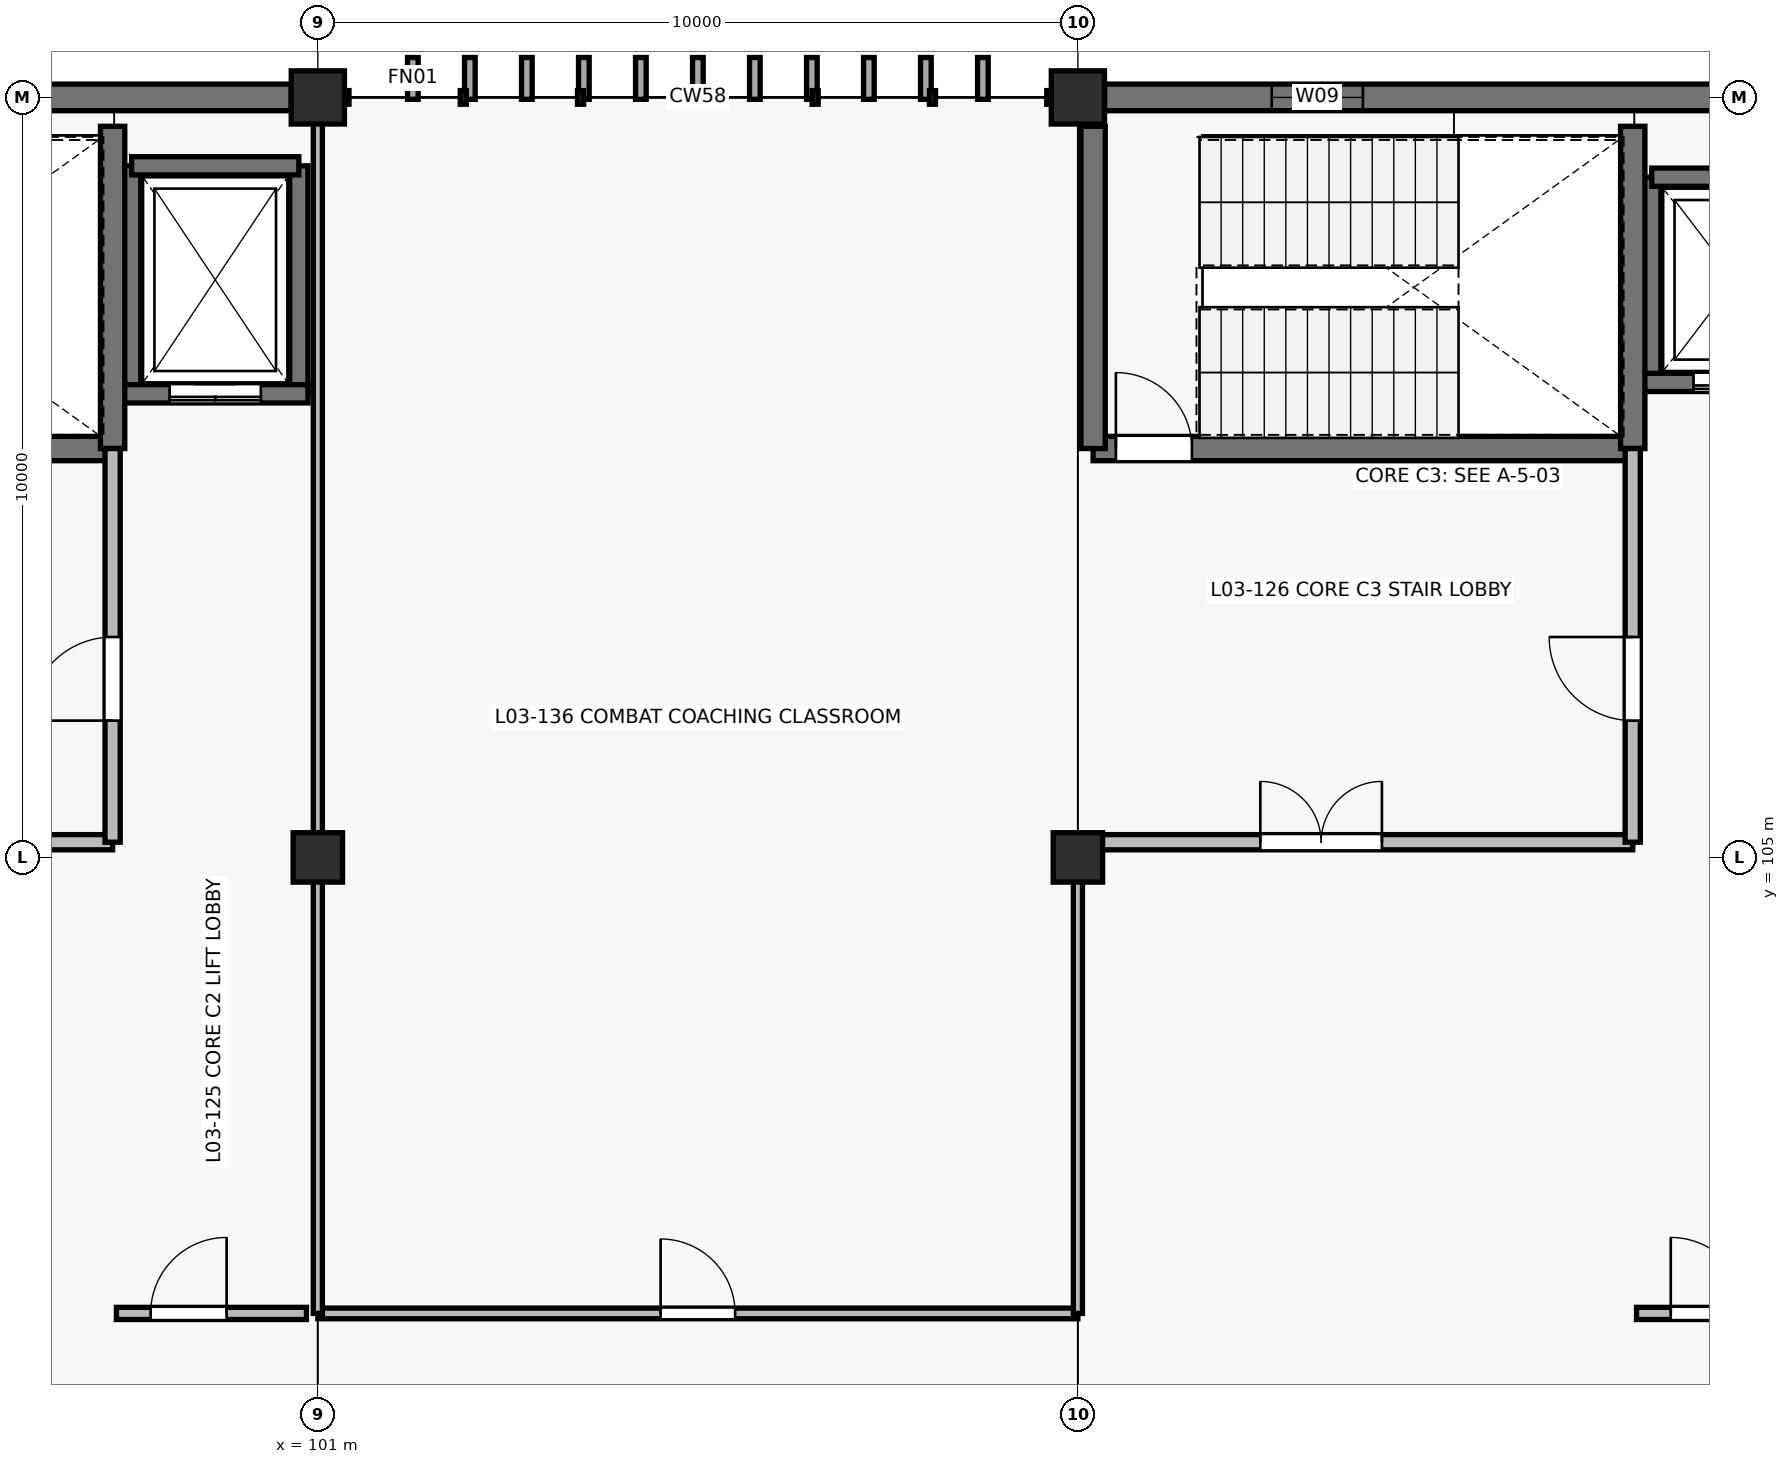
"""IFC4 building model, lengths in metres.
Left out: names, types, materials, properties, quantities, classifications, styles, units other than length and angle.
Written with IfcOpenShell. Run it as: python <this file> out.ifc"""

import sys

from ifc_helpers import new_model, si_unit, direction, frame, frame_2d, origin, origin_2d, place, context, subcontext, project, spatial, rectangle, circle, extrude, element, fill, save


model = new_model("IFC4")
c1 = context("Model", 3, precision=1e-05, world=origin(), true_north=direction((0.0, 1.0)))
c2 = subcontext(c1, "Body", "Model", "MODEL_VIEW")
j1 = project(units=[si_unit("LENGTHUNIT", "METRE"), si_unit("PLANEANGLEUNIT", "RADIAN")], contexts=[c1])
p1 = place(None, origin())
s1 = spatial("IfcSite", under=j1, at=p1, CompositionType="ELEMENT")
p2 = place(p1, origin())
s2 = spatial("IfcBuilding", under=s1, at=p2, CompositionType="ELEMENT")
p3 = place(p2, frame((0.0, 0.0, 13.2)))
s3 = spatial("IfcBuildingStorey", under=s2, at=p3, CompositionType="ELEMENT", Elevation=13.2)
p4 = place(p3, frame((101.0, 105.0, 0.0), z_axis=(0.0, 0.0, 1.0), x_axis=(1.0, 0.0, 0.0)))
e1 = element("IfcColumn", 1, at=p4, inside=s3, PredefinedType="COLUMN", context=c2, shape_type="SweptSolid", body=[
    extrude(rectangle(XDim=0.65, YDim=0.65, at=origin_2d()), origin(), (0.0, 0.0, 1.0), 4.2),
])
p5 = place(p3, frame((101.0, 115.0, 0.0), z_axis=(0.0, 0.0, 1.0), x_axis=(1.0, 0.0, 0.0)))
e2 = element("IfcColumn", 2, at=p5, inside=s3, PredefinedType="COLUMN", context=c2, shape_type="SweptSolid", body=[
    extrude(circle(Radius=0.35, at=origin_2d()), origin(), (0.0, 0.0, 1.0), 4.2),
])
p6 = place(p3, frame((111.0, 105.0, 0.0), z_axis=(0.0, 0.0, 1.0), x_axis=(1.0, 0.0, 0.0)))
e3 = element("IfcColumn", 3, at=p6, inside=s3, PredefinedType="COLUMN", context=c2, shape_type="SweptSolid", body=[
    extrude(rectangle(XDim=0.65, YDim=0.65, at=origin_2d()), origin(), (0.0, 0.0, 1.0), 4.2),
])
p7 = place(p3, frame((111.0, 115.0, 0.0), z_axis=(0.0, 0.0, 1.0), x_axis=(1.0, 0.0, 0.0)))
e4 = element("IfcColumn", 4, at=p7, inside=s3, PredefinedType="COLUMN", context=c2, shape_type="SweptSolid", body=[
    extrude(circle(Radius=0.35, at=origin_2d()), origin(), (0.0, 0.0, 1.0), 4.2),
])
p8 = place(p3, frame((91.35, 115.0, 0.0), z_axis=(0.0, 0.0, 1.0), x_axis=(1.0, 0.0, 0.0)))
e5 = element("IfcWall", 5, at=p8, inside=s3, PredefinedType="SOLIDWALL", context=c2, shape_type="SweptSolid", body=[
    extrude(rectangle(XDim=9.3, YDim=0.35, at=frame_2d((4.65, 0.0))), origin(), (0.0, 0.0, 1.0), 4.2),
])
p9 = place(p8, frame((2.2, 0.0, 1.0)))
e6 = element("IfcOpeningElement", 6, at=p9, cuts=e5, PredefinedType="OPENING", context=c2, shape_type="SweptSolid", body=[
    extrude(rectangle(XDim=2.4, YDim=1.5, at=frame_2d((1.2, 0.75))), frame((0.0, 0.185, 0.0), z_axis=(0.0, -1.0, 0.0), x_axis=(1.0, 0.0, 0.0)), (0.0, 0.0, 1.0), 0.37),
])
p10 = place(p3, frame((111.35, 115.0, 0.0), z_axis=(0.0, 0.0, 1.0), x_axis=(1.0, 0.0, 0.0)))
e7 = element("IfcWall", 7, at=p10, inside=s3, PredefinedType="SOLIDWALL", context=c2, shape_type="SweptSolid", body=[
    extrude(rectangle(XDim=9.3, YDim=0.35, at=frame_2d((4.65, 0.0))), origin(), (0.0, 0.0, 1.0), 4.2),
])
p11 = place(p10, frame((2.2, 0.0, 1.0)))
e8 = element("IfcOpeningElement", 8, at=p11, cuts=e7, PredefinedType="OPENING", context=c2, shape_type="SweptSolid", body=[
    extrude(rectangle(XDim=1.2, YDim=1.8, at=frame_2d((0.6, 0.9))), frame((0.0, 0.185, 0.0), z_axis=(0.0, -1.0, 0.0), x_axis=(1.0, 0.0, 0.0)), (0.0, 0.0, 1.0), 0.37),
])
for number, where, z_axis, x_axis in (
    (9, (98.55, 111.1, 0.0), (0.0, 0.0, 1.0), (0.0, 1.0, 0.0)),
    (10, (100.75, 114.1, 0.0), (0.0, 0.0, 1.0), (0.0, -1.0, 0.0)),
):
    element("IfcWall", number, at=place(p3, frame(where, z_axis=z_axis, x_axis=x_axis)), inside=s3, PredefinedType="SHEAR", context=c2, shape_type="SweptSolid", body=[
        extrude(rectangle(XDim=3.0, YDim=0.24, at=frame_2d((1.5, 0.0))), origin(), (0.0, 0.0, 1.0), 4.2),
    ])
p12 = place(p3, frame((98.55, 114.1, 0.0), z_axis=(0.0, 0.0, 1.0), x_axis=(1.0, 0.0, 0.0)))
e11 = element("IfcWall", 11, at=p12, inside=s3, PredefinedType="SHEAR", context=c2, shape_type="SweptSolid", body=[
    extrude(rectangle(XDim=2.2, YDim=0.24, at=frame_2d((1.1, 0.0))), origin(), (0.0, 0.0, 1.0), 4.2),
])
p13 = place(p3, frame((100.87, 111.1, 0.0), z_axis=(0.0, 0.0, 1.0), x_axis=(-1.0, 0.0, 0.0)))
e12 = element("IfcWall", 12, at=p13, inside=s3, PredefinedType="SHEAR", context=c2, shape_type="SweptSolid", body=[
    extrude(rectangle(XDim=2.44, YDim=0.24, at=frame_2d((1.22, 0.0))), origin(), (0.0, 0.0, 1.0), 4.2),
])
p14 = place(p13, frame((0.62, 0.0, 0.0)))
e13 = element("IfcOpeningElement", 13, at=p14, cuts=e12, PredefinedType="OPENING", context=c2, shape_type="SweptSolid", body=[
    extrude(rectangle(XDim=1.2, YDim=2.15, at=frame_2d((0.6, 1.075))), frame((0.0, 0.13, 0.0), z_axis=(0.0, -1.0, 0.0), x_axis=(1.0, 0.0, 0.0)), (0.0, 0.0, 1.0), 0.26),
])
p15 = place(p3, frame((118.55, 111.25, 0.0), z_axis=(0.0, 0.0, 1.0), x_axis=(0.0, 1.0, 0.0)))
e14 = element("IfcWall", 14, at=p15, inside=s3, PredefinedType="SHEAR", context=c2, shape_type="SweptSolid", body=[
    extrude(rectangle(XDim=2.7, YDim=0.24, at=frame_2d((1.35, 0.0))), origin(), (0.0, 0.0, 1.0), 4.2),
])
p16 = place(p3, frame((118.55, 113.95, 0.0), z_axis=(0.0, 0.0, 1.0), x_axis=(1.0, 0.0, 0.0)))
e15 = element("IfcWall", 15, at=p16, inside=s3, PredefinedType="SHEAR", context=c2, shape_type="SweptSolid", body=[
    extrude(rectangle(XDim=2.2, YDim=0.24, at=frame_2d((1.1, 0.0))), origin(), (0.0, 0.0, 1.0), 4.2),
])
p17 = place(p3, frame((120.87, 111.25, 0.0), z_axis=(0.0, 0.0, 1.0), x_axis=(-1.0, 0.0, 0.0)))
e16 = element("IfcWall", 16, at=p17, inside=s3, PredefinedType="SHEAR", context=c2, shape_type="SweptSolid", body=[
    extrude(rectangle(XDim=2.44, YDim=0.24, at=frame_2d((1.22, 0.0))), origin(), (0.0, 0.0, 1.0), 4.2),
])
p18 = place(p17, frame((0.67, 0.0, 0.0)))
e17 = element("IfcOpeningElement", 17, at=p18, cuts=e16, PredefinedType="OPENING", context=c2, shape_type="SweptSolid", body=[
    extrude(rectangle(XDim=1.1, YDim=2.15, at=frame_2d((0.55, 1.075))), frame((0.0, 0.13, 0.0), z_axis=(0.0, -1.0, 0.0), x_axis=(1.0, 0.0, 0.0)), (0.0, 0.0, 1.0), 0.26),
])
p19 = place(p3, frame((91.2, 110.38, 0.0), z_axis=(0.0, 0.0, 1.0), x_axis=(1.0, 0.0, 0.0)))
e18 = element("IfcWall", 18, at=p19, inside=s3, PredefinedType="SHEAR", context=c2, shape_type="SweptSolid", body=[
    extrude(rectangle(XDim=7.1, YDim=0.32, at=frame_2d((3.55, 0.0))), origin(), (0.0, 0.0, 1.0), 4.2),
])
p20 = place(p19, frame((0.3, 0.0, 0.0)))
e19 = element("IfcOpeningElement", 19, at=p20, cuts=e18, PredefinedType="OPENING", context=c2, shape_type="SweptSolid", body=[
    extrude(rectangle(XDim=1.0, YDim=2.15, at=frame_2d((0.5, 1.075))), frame((0.0, 0.17, 0.0), z_axis=(0.0, -1.0, 0.0), x_axis=(1.0, 0.0, 0.0)), (0.0, 0.0, 1.0), 0.34),
])
p21 = place(p3, frame((98.3, 110.38, 0.0), z_axis=(0.0, 0.0, 1.0), x_axis=(0.0, 1.0, 0.0)))
e20 = element("IfcWall", 20, at=p21, inside=s3, PredefinedType="SHEAR", context=c2, shape_type="SweptSolid", body=[
    extrude(rectangle(XDim=4.24, YDim=0.32, at=frame_2d((2.12, 0.0))), origin(), (0.0, 0.0, 1.0), 4.2),
])
p22 = place(p3, frame((91.2, 105.2, 0.0), z_axis=(0.0, 0.0, 1.0), x_axis=(1.0, 0.0, 0.0)))
e21 = element("IfcWall", 21, at=p22, inside=s3, PredefinedType="PARTITIONING", context=c2, shape_type="SweptSolid", body=[
    extrude(rectangle(XDim=7.1, YDim=0.2, at=frame_2d((3.55, 0.0))), origin(), (0.0, 0.0, 1.0), 3.005),
])
p23 = place(p22, frame((2.2, 0.0, 0.0)))
e22 = element("IfcOpeningElement", 22, at=p23, cuts=e21, PredefinedType="OPENING", context=c2, shape_type="SweptSolid", body=[
    extrude(rectangle(XDim=1.6, YDim=2.2, at=frame_2d((0.8, 1.1))), frame((0.0, 0.11, 0.0), z_axis=(0.0, -1.0, 0.0), x_axis=(1.0, 0.0, 0.0)), (0.0, 0.0, 1.0), 0.22),
])
p24 = place(p3, frame((98.3, 105.2, 0.0), z_axis=(0.0, 0.0, 1.0), x_axis=(0.0, 1.0, 0.0)))
e23 = element("IfcWall", 23, at=p24, inside=s3, PredefinedType="PARTITIONING", context=c2, shape_type="SweptSolid", body=[
    extrude(rectangle(XDim=5.18, YDim=0.2, at=frame_2d((2.59, 0.0))), origin(), (0.0, 0.0, 1.0), 3.005),
])
p25 = place(p24, frame((1.6, 0.0, 0.0)))
e24 = element("IfcOpeningElement", 24, at=p25, cuts=e23, PredefinedType="OPENING", context=c2, shape_type="SweptSolid", body=[
    extrude(rectangle(XDim=1.1, YDim=2.15, at=frame_2d((0.55, 1.075))), frame((0.0, 0.11, 0.0), z_axis=(0.0, -1.0, 0.0), x_axis=(1.0, 0.0, 0.0)), (0.0, 0.0, 1.0), 0.22),
])
p26 = place(p3, frame((98.35, 99.0, 0.0), z_axis=(0.0, 0.0, 1.0), x_axis=(1.0, 0.0, 0.0)))
e25 = element("IfcWall", 25, at=p26, inside=s3, PredefinedType="PARTITIONING", context=c2, shape_type="SweptSolid", body=[
    extrude(rectangle(XDim=2.5, YDim=0.16, at=frame_2d((1.25, 0.0))), origin(), (0.0, 0.0, 1.0), 3.005),
])
p27 = place(p26, frame((0.45, 0.0, 0.0)))
e26 = element("IfcOpeningElement", 26, at=p27, cuts=e25, PredefinedType="OPENING", context=c2, shape_type="SweptSolid", body=[
    extrude(rectangle(XDim=1.0, YDim=2.15, at=frame_2d((0.5, 1.075))), frame((0.0, 0.09, 0.0), z_axis=(0.0, -1.0, 0.0), x_axis=(1.0, 0.0, 0.0)), (0.0, 0.0, 1.0), 0.18),
])
p28 = place(p3, frame((111.2, 110.38, 0.0), z_axis=(0.0, 0.0, 1.0), x_axis=(1.0, 0.0, 0.0)))
e27 = element("IfcWall", 27, at=p28, inside=s3, PredefinedType="SHEAR", context=c2, shape_type="SweptSolid", body=[
    extrude(rectangle(XDim=7.1, YDim=0.32, at=frame_2d((3.55, 0.0))), origin(), (0.0, 0.0, 1.0), 4.2),
])
p29 = place(p28, frame((0.3, 0.0, 0.0)))
e28 = element("IfcOpeningElement", 28, at=p29, cuts=e27, PredefinedType="OPENING", context=c2, shape_type="SweptSolid", body=[
    extrude(rectangle(XDim=1.0, YDim=2.15, at=frame_2d((0.5, 1.075))), frame((0.0, 0.17, 0.0), z_axis=(0.0, -1.0, 0.0), x_axis=(1.0, 0.0, 0.0)), (0.0, 0.0, 1.0), 0.34),
])
for number, where, z_axis, x_axis in (
    (29, (118.3, 110.38, 0.0), (0.0, 0.0, 1.0), (0.0, 1.0, 0.0)),
    (30, (111.2, 114.62, 0.0), (0.0, 0.0, 1.0), (0.0, -1.0, 0.0)),
):
    element("IfcWall", number, at=place(p3, frame(where, z_axis=z_axis, x_axis=x_axis)), inside=s3, PredefinedType="SHEAR", context=c2, shape_type="SweptSolid", body=[
        extrude(rectangle(XDim=4.24, YDim=0.32, at=frame_2d((2.12, 0.0))), origin(), (0.0, 0.0, 1.0), 4.2),
    ])
p30 = place(p3, frame((111.2, 105.2, 0.0), z_axis=(0.0, 0.0, 1.0), x_axis=(1.0, 0.0, 0.0)))
e31 = element("IfcWall", 31, at=p30, inside=s3, PredefinedType="PARTITIONING", context=c2, shape_type="SweptSolid", body=[
    extrude(rectangle(XDim=7.1, YDim=0.2, at=frame_2d((3.55, 0.0))), origin(), (0.0, 0.0, 1.0), 3.005),
])
p31 = place(p30, frame((2.2, 0.0, 0.0)))
e32 = element("IfcOpeningElement", 32, at=p31, cuts=e31, PredefinedType="OPENING", context=c2, shape_type="SweptSolid", body=[
    extrude(rectangle(XDim=1.6, YDim=2.2, at=frame_2d((0.8, 1.1))), frame((0.0, 0.11, 0.0), z_axis=(0.0, -1.0, 0.0), x_axis=(1.0, 0.0, 0.0)), (0.0, 0.0, 1.0), 0.22),
])
p32 = place(p3, frame((118.3, 105.2, 0.0), z_axis=(0.0, 0.0, 1.0), x_axis=(0.0, 1.0, 0.0)))
e33 = element("IfcWall", 33, at=p32, inside=s3, PredefinedType="PARTITIONING", context=c2, shape_type="SweptSolid", body=[
    extrude(rectangle(XDim=5.18, YDim=0.2, at=frame_2d((2.59, 0.0))), origin(), (0.0, 0.0, 1.0), 3.005),
])
p33 = place(p32, frame((1.6, 0.0, 0.0)))
e34 = element("IfcOpeningElement", 34, at=p33, cuts=e33, PredefinedType="OPENING", context=c2, shape_type="SweptSolid", body=[
    extrude(rectangle(XDim=1.1, YDim=2.15, at=frame_2d((0.55, 1.075))), frame((0.0, 0.11, 0.0), z_axis=(0.0, -1.0, 0.0), x_axis=(1.0, 0.0, 0.0)), (0.0, 0.0, 1.0), 0.22),
])
p34 = place(p3, frame((118.35, 99.0, 0.0), z_axis=(0.0, 0.0, 1.0), x_axis=(1.0, 0.0, 0.0)))
e35 = element("IfcWall", 35, at=p34, inside=s3, PredefinedType="PARTITIONING", context=c2, shape_type="SweptSolid", body=[
    extrude(rectangle(XDim=2.5, YDim=0.16, at=frame_2d((1.25, 0.0))), origin(), (0.0, 0.0, 1.0), 3.005),
])
p35 = place(p34, frame((0.45, 0.0, 0.0)))
e36 = element("IfcOpeningElement", 36, at=p35, cuts=e35, PredefinedType="OPENING", context=c2, shape_type="SweptSolid", body=[
    extrude(rectangle(XDim=1.0, YDim=2.15, at=frame_2d((0.5, 1.075))), frame((0.0, 0.09, 0.0), z_axis=(0.0, -1.0, 0.0), x_axis=(1.0, 0.0, 0.0)), (0.0, 0.0, 1.0), 0.18),
])
p36 = place(p3, frame((101.0, 99.0, 0.0), z_axis=(0.0, 0.0, 1.0), x_axis=(1.0, 0.0, 0.0)))
e37 = element("IfcWall", 37, at=p36, inside=s3, PredefinedType="PARTITIONING", context=c2, shape_type="SweptSolid", body=[
    extrude(rectangle(XDim=10.0, YDim=0.14, at=frame_2d((5.0, 0.0))), origin(), (0.0, 0.0, 1.0), 3.005),
])
p37 = place(p36, frame((4.51, 0.0, 0.0)))
e38 = element("IfcOpeningElement", 38, at=p37, cuts=e37, PredefinedType="OPENING", context=c2, shape_type="SweptSolid", body=[
    extrude(rectangle(XDim=0.98, YDim=2.1, at=frame_2d((0.49, 1.05))), frame((0.0, 0.08, 0.0), z_axis=(0.0, -1.0, 0.0), x_axis=(1.0, 0.0, 0.0)), (0.0, 0.0, 1.0), 0.16),
])
p38 = place(p3, frame((101.0, 99.0, 0.0), z_axis=(0.0, 0.0, 1.0), x_axis=(0.0, 1.0, 0.0)))
e39 = element("IfcWall", 39, at=p38, inside=s3, PredefinedType="PARTITIONING", context=c2, shape_type="SweptSolid", body=[
    extrude(rectangle(XDim=15.75, YDim=0.12, at=frame_2d((7.875, 0.0))), origin(), (0.0, 0.0, 1.0), 3.005),
])
p39 = place(p3, frame((111.0, 99.0, 0.0), z_axis=(0.0, 0.0, 1.0), x_axis=(0.0, 1.0, 0.0)))
e40 = element("IfcWall", 40, at=p39, inside=s3, PredefinedType="PARTITIONING", context=c2, shape_type="SweptSolid", body=[
    extrude(rectangle(XDim=6.2, YDim=0.12, at=frame_2d((3.1, 0.0))), origin(), (0.0, 0.0, 1.0), 3.005),
])
p40 = place(p11, origin())
e41 = element("IfcWindow", 41, at=p40, inside=s3, PartitioningType="SINGLE_PANEL", PredefinedType="WINDOW", context=c2, shape_type="SweptSolid", body=[
    extrude(rectangle(XDim=1.2, YDim=1.8, at=frame_2d((0.6, 0.9))), frame((0.0, 0.03, 0.0), z_axis=(0.0, -1.0, 0.0), x_axis=(1.0, 0.0, 0.0)), (0.0, 0.0, 1.0), 0.06),
])
fill(e8, e41)
p41 = place(p14, origin())
e42 = element("IfcDoor", 42, at=p41, inside=s3, OperationType="DOUBLE_DOOR_SLIDING", PredefinedType="USERDEFINED", context=c2, shape_type="SweptSolid", body=[
    extrude(rectangle(XDim=1.2, YDim=2.15, at=frame_2d((0.6, 1.075))), frame((0.0, 0.025, 0.0), z_axis=(0.0, -1.0, 0.0), x_axis=(1.0, 0.0, 0.0)), (0.0, 0.0, 1.0), 0.05),
])
fill(e13, e42)
p42 = place(p18, origin())
e43 = element("IfcDoor", 43, at=p42, inside=s3, OperationType="DOUBLE_DOOR_SLIDING", PredefinedType="USERDEFINED", context=c2, shape_type="SweptSolid", body=[
    extrude(rectangle(XDim=1.1, YDim=2.15, at=frame_2d((0.55, 1.075))), frame((0.0, 0.025, 0.0), z_axis=(0.0, -1.0, 0.0), x_axis=(1.0, 0.0, 0.0)), (0.0, 0.0, 1.0), 0.05),
])
fill(e17, e43)
p43 = place(p25, origin())
e44 = element("IfcDoor", 44, at=p43, inside=s3, OperationType="SINGLE_SWING_LEFT", PredefinedType="DOOR", context=c2, shape_type="SweptSolid", body=[
    extrude(rectangle(XDim=1.1, YDim=2.15, at=frame_2d((0.55, 1.075))), frame((0.0, 0.025, 0.0), z_axis=(0.0, -1.0, 0.0), x_axis=(1.0, 0.0, 0.0)), (0.0, 0.0, 1.0), 0.05),
])
fill(e24, e44)
p44 = place(p27, origin())
e45 = element("IfcDoor", 45, at=p44, inside=s3, OperationType="SINGLE_SWING_RIGHT", PredefinedType="DOOR", context=c2, shape_type="SweptSolid", body=[
    extrude(rectangle(XDim=1.0, YDim=2.15, at=frame_2d((0.5, 1.075))), frame((0.0, 0.025, 0.0), z_axis=(0.0, -1.0, 0.0), x_axis=(1.0, 0.0, 0.0)), (0.0, 0.0, 1.0), 0.05),
])
fill(e26, e45)
p45 = place(p29, origin())
e46 = element("IfcDoor", 46, at=p45, inside=s3, OperationType="SINGLE_SWING_LEFT", PredefinedType="DOOR", context=c2, shape_type="SweptSolid", body=[
    extrude(rectangle(XDim=1.0, YDim=2.15, at=frame_2d((0.5, 1.075))), frame((0.0, 0.025, 0.0), z_axis=(0.0, -1.0, 0.0), x_axis=(1.0, 0.0, 0.0)), (0.0, 0.0, 1.0), 0.05),
])
fill(e28, e46)
p46 = place(p31, origin())
e47 = element("IfcDoor", 47, at=p46, inside=s3, OperationType="DOUBLE_DOOR_SINGLE_SWING", PredefinedType="DOOR", context=c2, shape_type="SweptSolid", body=[
    extrude(rectangle(XDim=1.6, YDim=2.2, at=frame_2d((0.8, 1.1))), frame((0.0, 0.025, 0.0), z_axis=(0.0, -1.0, 0.0), x_axis=(1.0, 0.0, 0.0)), (0.0, 0.0, 1.0), 0.05),
])
fill(e32, e47)
p47 = place(p33, origin())
e48 = element("IfcDoor", 48, at=p47, inside=s3, OperationType="SINGLE_SWING_RIGHT", PredefinedType="DOOR", context=c2, shape_type="SweptSolid", body=[
    extrude(rectangle(XDim=1.1, YDim=2.15, at=frame_2d((0.55, 1.075))), frame((0.0, 0.025, 0.0), z_axis=(0.0, -1.0, 0.0), x_axis=(1.0, 0.0, 0.0)), (0.0, 0.0, 1.0), 0.05),
])
fill(e34, e48)
p48 = place(p35, origin())
e49 = element("IfcDoor", 49, at=p48, inside=s3, OperationType="SINGLE_SWING_LEFT", PredefinedType="DOOR", context=c2, shape_type="SweptSolid", body=[
    extrude(rectangle(XDim=1.0, YDim=2.15, at=frame_2d((0.5, 1.075))), frame((0.0, 0.025, 0.0), z_axis=(0.0, -1.0, 0.0), x_axis=(1.0, 0.0, 0.0)), (0.0, 0.0, 1.0), 0.05),
])
fill(e36, e49)
p49 = place(p37, origin())
e50 = element("IfcDoor", 50, at=p49, inside=s3, OperationType="SINGLE_SWING_LEFT", PredefinedType="DOOR", context=c2, shape_type="SweptSolid", body=[
    extrude(rectangle(XDim=0.98, YDim=2.1, at=frame_2d((0.49, 1.05))), frame((0.0, 0.025, 0.0), z_axis=(0.0, -1.0, 0.0), x_axis=(1.0, 0.0, 0.0)), (0.0, 0.0, 1.0), 0.05),
])
fill(e38, e50)
save(model, sys.argv[1])
